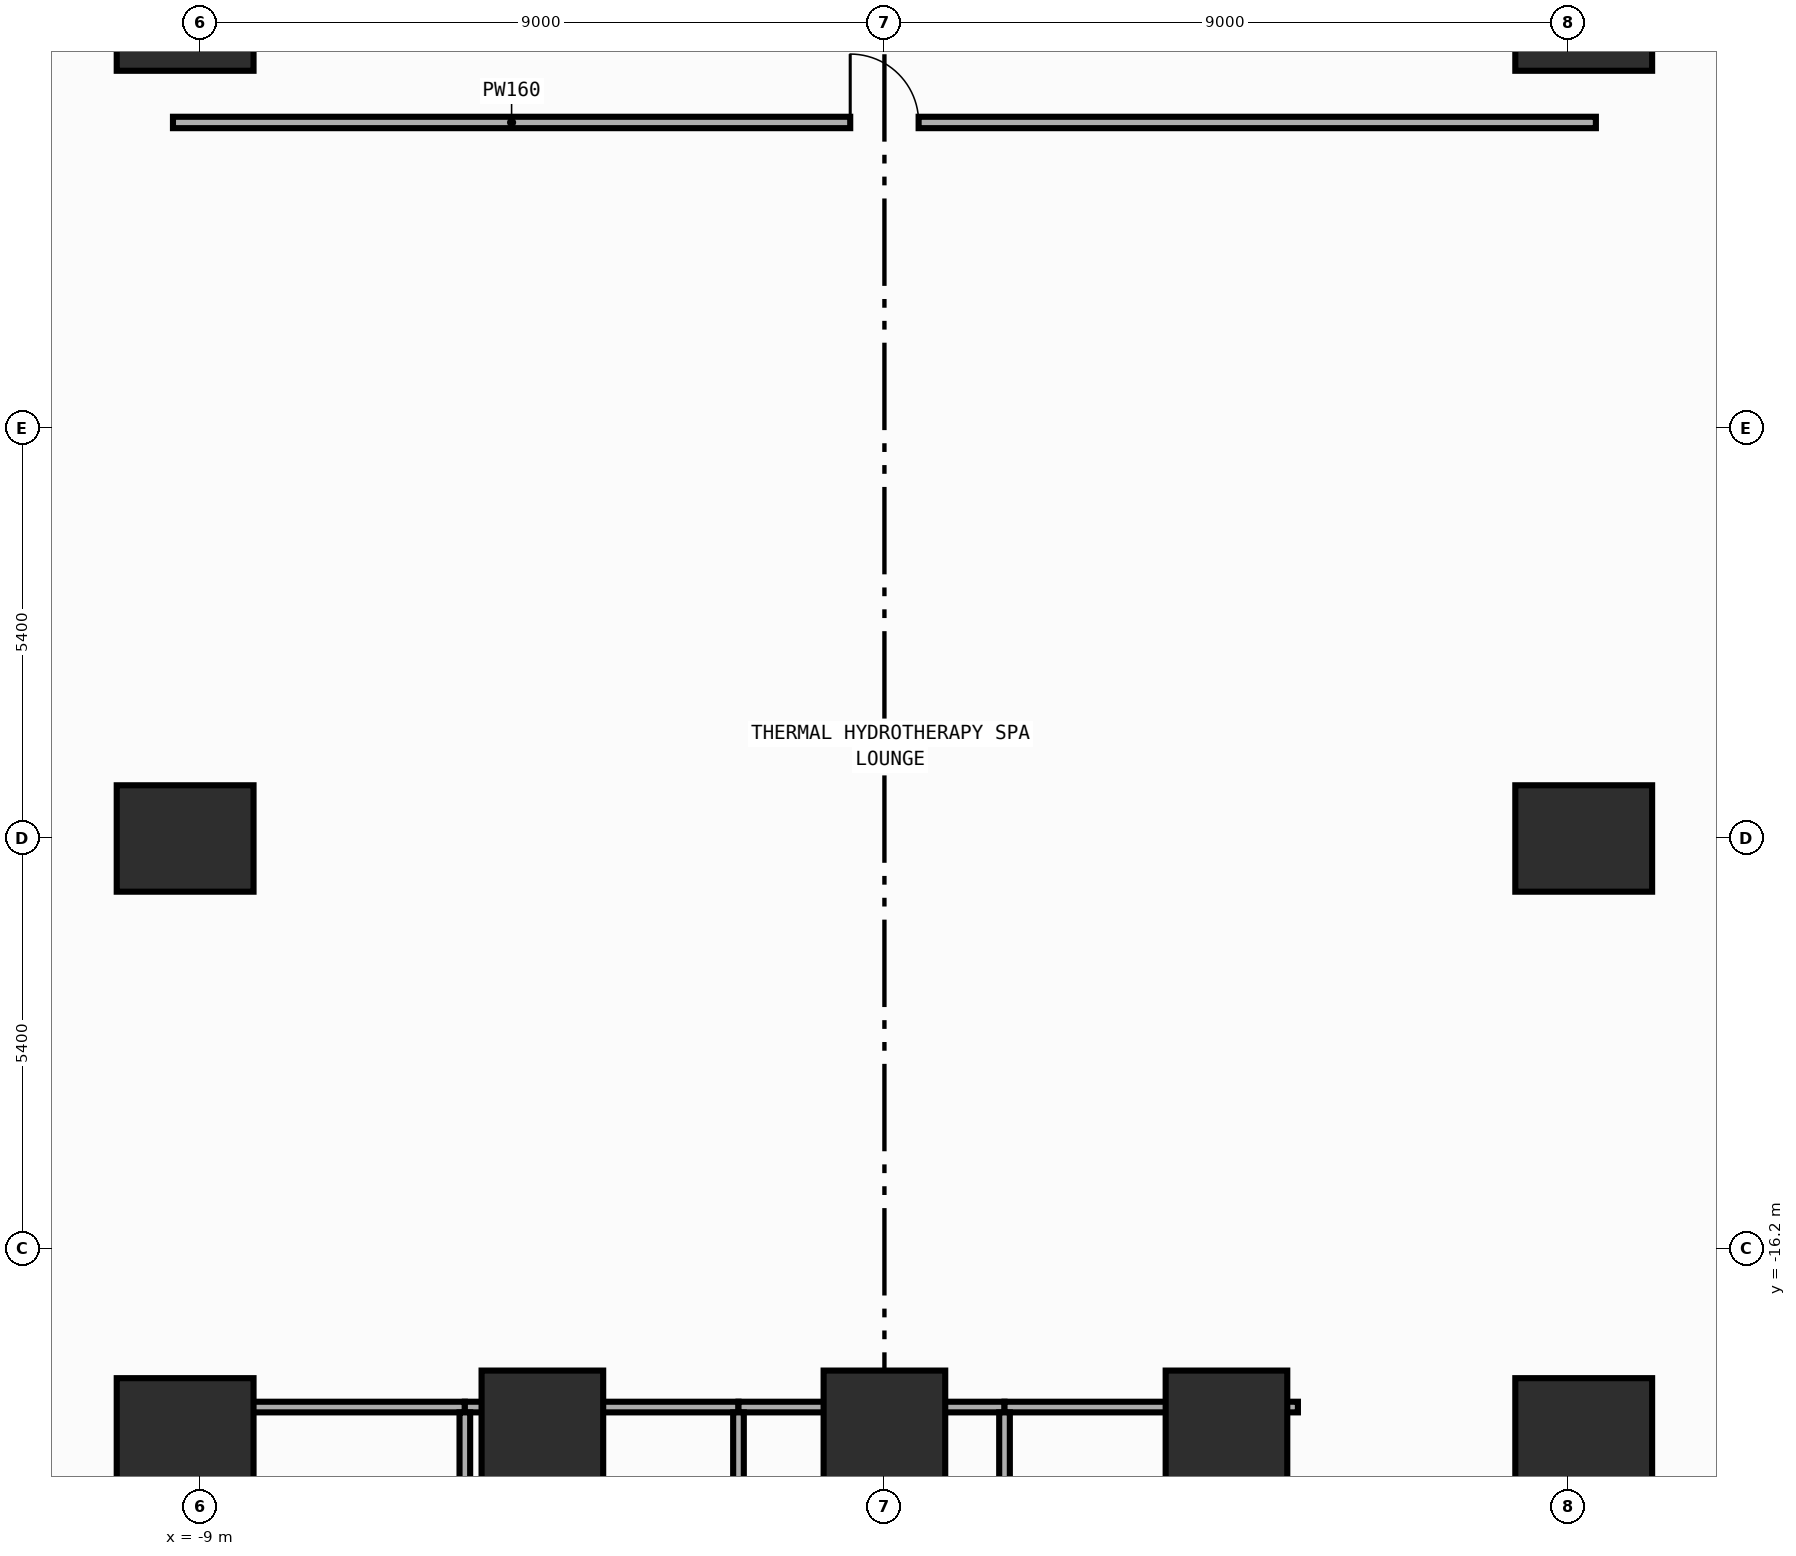
"""IFC4 building model, lengths in metres.
Left out: names, types, materials, properties, quantities, classifications, styles, units other than length and angle.
Written with IfcOpenShell. Run it as: python <this file> out.ifc"""

import sys

from ifc_helpers import new_model, si_unit, direction, frame, frame_2d, origin, origin_2d, place, context, subcontext, project, spatial, rectangle, extrude, element, fill, save


model = new_model("IFC4")
c1 = context("Model", 3, precision=1e-05, world=origin(), true_north=direction((0.0, 1.0)))
c2 = subcontext(c1, "Body", "Model", "MODEL_VIEW")
j1 = project(units=[si_unit("LENGTHUNIT", "METRE"), si_unit("PLANEANGLEUNIT", "RADIAN")], contexts=[c1])
p1 = place(None, origin())
s1 = spatial("IfcSite", under=j1, at=p1, CompositionType="ELEMENT")
p2 = place(p1, origin())
s2 = spatial("IfcBuilding", under=s1, at=p2, CompositionType="ELEMENT")
p3 = place(p2, frame((0.0, 0.0, 21.0)))
s3 = spatial("IfcBuildingStorey", under=s2, at=p3, CompositionType="ELEMENT", Elevation=21.0)
for number, where, z_axis, x_axis in (
    (1, (-9.2, -18.6, 0.0), (0.0, 0.0, 1.0), (1.0, 0.0, 0.0)),
    (2, (-9.2, -10.8, 0.0), (0.0, 0.0, 1.0), (1.0, 0.0, 0.0)),
    (3, (-9.2, 0.0, 0.0), (0.0, 0.0, 1.0), (1.0, 0.0, 0.0)),
    (4, (9.2, -18.6, 0.0), (0.0, 0.0, 1.0), (1.0, 0.0, 0.0)),
    (5, (9.2, -10.8, 0.0), (0.0, 0.0, 1.0), (1.0, 0.0, 0.0)),
    (6, (9.2, 0.0, 0.0), (0.0, 0.0, 1.0), (1.0, 0.0, 0.0)),
):
    element("IfcColumn", number, at=place(p3, frame(where, z_axis=z_axis, x_axis=x_axis)), inside=s3, PredefinedType="COLUMN", context=c2, shape_type="SweptSolid", body=[
        extrude(rectangle(XDim=1.8, YDim=1.4, at=origin_2d()), origin(), (0.0, 0.0, 1.0), 5.0),
    ])
for number, where, z_axis, x_axis in (
    (7, (-4.5, -18.6, 0.0), (0.0, 0.0, 1.0), (1.0, 0.0, 0.0)),
    (8, (0.0, -18.6, 0.0), (0.0, 0.0, 1.0), (1.0, 0.0, 0.0)),
    (9, (4.5, -18.6, 0.0), (0.0, 0.0, 1.0), (1.0, 0.0, 0.0)),
):
    element("IfcColumn", number, at=place(p3, frame(where, z_axis=z_axis, x_axis=x_axis)), inside=s3, PredefinedType="COLUMN", context=c2, shape_type="SweptSolid", body=[
        extrude(rectangle(XDim=1.6, YDim=1.6, at=origin_2d()), origin(), (0.0, 0.0, 1.0), 5.0),
    ])
p4 = place(p3, frame((-9.36, -1.38, 0.0), z_axis=(0.0, 0.0, 1.0), x_axis=(1.0, 0.0, 0.0)))
e10 = element("IfcWall", 10, at=p4, inside=s3, PredefinedType="PARTITIONING", context=c2, shape_type="SweptSolid", body=[
    extrude(rectangle(XDim=18.72, YDim=0.15, at=frame_2d((9.36, 0.0))), origin(), (0.0, 0.0, 1.0), 4.74),
])
p5 = place(p4, frame((8.91, 0.0, 0.0)))
e11 = element("IfcOpeningElement", 11, at=p5, cuts=e10, PredefinedType="OPENING", context=c2, shape_type="SweptSolid", body=[
    extrude(rectangle(XDim=0.9, YDim=2.15, at=frame_2d((0.45, 1.075))), frame((0.0, 0.085, 0.0), z_axis=(0.0, -1.0, 0.0), x_axis=(1.0, 0.0, 0.0)), (0.0, 0.0, 1.0), 0.17),
])
p6 = place(p3, frame((-9.16, -26.609, 0.0), z_axis=(0.0, 0.0, 1.0), x_axis=(0.0, 1.0, 0.0)))
e12 = element("IfcWall", 12, at=p6, inside=s3, PredefinedType="PARTITIONING", context=c2, shape_type="SweptSolid", body=[
    extrude(rectangle(XDim=8.399, YDim=0.14, at=frame_2d((4.2, 0.0))), origin(), (0.0, 0.0, 1.0), 3.94),
])
p7 = place(p6, frame((2.067, 0.0, 0.0)))
e13 = element("IfcOpeningElement", 13, at=p7, cuts=e12, PredefinedType="OPENING", context=c2, shape_type="SweptSolid", body=[
    extrude(rectangle(XDim=0.85, YDim=2.1, at=frame_2d((0.425, 1.05))), frame((0.0, 0.08, 0.0), z_axis=(0.0, -1.0, 0.0), x_axis=(1.0, 0.0, 0.0)), (0.0, 0.0, 1.0), 0.16),
])
p8 = place(p3, frame((-9.09, -18.28, 0.0), z_axis=(0.0, 0.0, 1.0), x_axis=(1.0, 0.0, 0.0)))
e14 = element("IfcWall", 14, at=p8, inside=s3, PredefinedType="PARTITIONING", context=c2, shape_type="SweptSolid", body=[
    extrude(rectangle(XDim=3.57, YDim=0.14, at=frame_2d((1.785, 0.0))), origin(), (0.0, 0.0, 1.0), 3.94),
])
p9 = place(p3, frame((-5.52, -18.28, 0.0), z_axis=(0.0, 0.0, 1.0), x_axis=(1.0, 0.0, 0.0)))
e15 = element("IfcWall", 15, at=p9, inside=s3, PredefinedType="PARTITIONING", context=c2, shape_type="SweptSolid", body=[
    extrude(rectangle(XDim=3.6, YDim=0.14, at=frame_2d((1.8, 0.0))), origin(), (0.0, 0.0, 1.0), 3.94),
])
p10 = place(p3, frame((-1.92, -18.28, 0.0), z_axis=(0.0, 0.0, 1.0), x_axis=(1.0, 0.0, 0.0)))
e16 = element("IfcWall", 16, at=p10, inside=s3, PredefinedType="PARTITIONING", context=c2, shape_type="SweptSolid", body=[
    extrude(rectangle(XDim=3.5, YDim=0.14, at=frame_2d((1.75, 0.0))), origin(), (0.0, 0.0, 1.0), 3.94),
])
p11 = place(p3, frame((1.58, -18.28, 0.0), z_axis=(0.0, 0.0, 1.0), x_axis=(1.0, 0.0, 0.0)))
e17 = element("IfcWall", 17, at=p11, inside=s3, PredefinedType="PARTITIONING", context=c2, shape_type="SweptSolid", body=[
    extrude(rectangle(XDim=3.86, YDim=0.14, at=frame_2d((1.93, 0.0))), origin(), (0.0, 0.0, 1.0), 3.94),
])
p12 = place(p3, frame((-5.52, -26.592, 0.0), z_axis=(0.0, 0.0, 1.0), x_axis=(0.0, 1.0, 0.0)))
e18 = element("IfcWall", 18, at=p12, inside=s3, PredefinedType="PARTITIONING", context=c2, shape_type="SweptSolid", body=[
    extrude(rectangle(XDim=8.241, YDim=0.14, at=frame_2d((4.121, 0.0))), origin(), (0.0, 0.0, 1.0), 4.74),
])
p13 = place(p12, frame((1.067, 0.0, 0.0)))
e19 = element("IfcOpeningElement", 19, at=p13, cuts=e18, PredefinedType="OPENING", context=c2, shape_type="SweptSolid", body=[
    extrude(rectangle(XDim=0.85, YDim=2.1, at=frame_2d((0.425, 1.05))), frame((0.0, 0.08, 0.0), z_axis=(0.0, -1.0, 0.0), x_axis=(1.0, 0.0, 0.0)), (0.0, 0.0, 1.0), 0.16),
])
p14 = place(p3, frame((-1.92, -26.574, 0.0), z_axis=(0.0, 0.0, 1.0), x_axis=(0.0, 1.0, 0.0)))
e20 = element("IfcWall", 20, at=p14, inside=s3, PredefinedType="PARTITIONING", context=c2, shape_type="SweptSolid", body=[
    extrude(rectangle(XDim=8.224, YDim=0.14, at=frame_2d((4.112, 0.0))), origin(), (0.0, 0.0, 1.0), 4.74),
])
p15 = place(p14, frame((1.065, 0.0, 0.0)))
e21 = element("IfcOpeningElement", 21, at=p15, cuts=e20, PredefinedType="OPENING", context=c2, shape_type="SweptSolid", body=[
    extrude(rectangle(XDim=0.85, YDim=2.1, at=frame_2d((0.425, 1.05))), frame((0.0, 0.08, 0.0), z_axis=(0.0, -1.0, 0.0), x_axis=(1.0, 0.0, 0.0)), (0.0, 0.0, 1.0), 0.16),
])
p16 = place(p3, frame((1.58, -26.557, 0.0), z_axis=(0.0, 0.0, 1.0), x_axis=(0.0, 1.0, 0.0)))
e22 = element("IfcWall", 22, at=p16, inside=s3, PredefinedType="PARTITIONING", context=c2, shape_type="SweptSolid", body=[
    extrude(rectangle(XDim=8.207, YDim=0.14, at=frame_2d((4.104, 0.0))), origin(), (0.0, 0.0, 1.0), 4.74),
])
p17 = place(p16, frame((1.063, 0.0, 0.0)))
e23 = element("IfcOpeningElement", 23, at=p17, cuts=e22, PredefinedType="OPENING", context=c2, shape_type="SweptSolid", body=[
    extrude(rectangle(XDim=0.85, YDim=2.1, at=frame_2d((0.425, 1.05))), frame((0.0, 0.08, 0.0), z_axis=(0.0, -1.0, 0.0), x_axis=(1.0, 0.0, 0.0)), (0.0, 0.0, 1.0), 0.16),
])
p18 = place(p5, origin())
e24 = element("IfcDoor", 24, at=p18, inside=s3, OperationType="SINGLE_SWING_LEFT", PredefinedType="DOOR", context=c2, shape_type="SweptSolid", body=[
    extrude(rectangle(XDim=0.9, YDim=2.15, at=frame_2d((0.45, 1.075))), frame((0.0, 0.025, 0.0), z_axis=(0.0, -1.0, 0.0), x_axis=(1.0, 0.0, 0.0)), (0.0, 0.0, 1.0), 0.05),
])
fill(e11, e24)
save(model, sys.argv[1])
